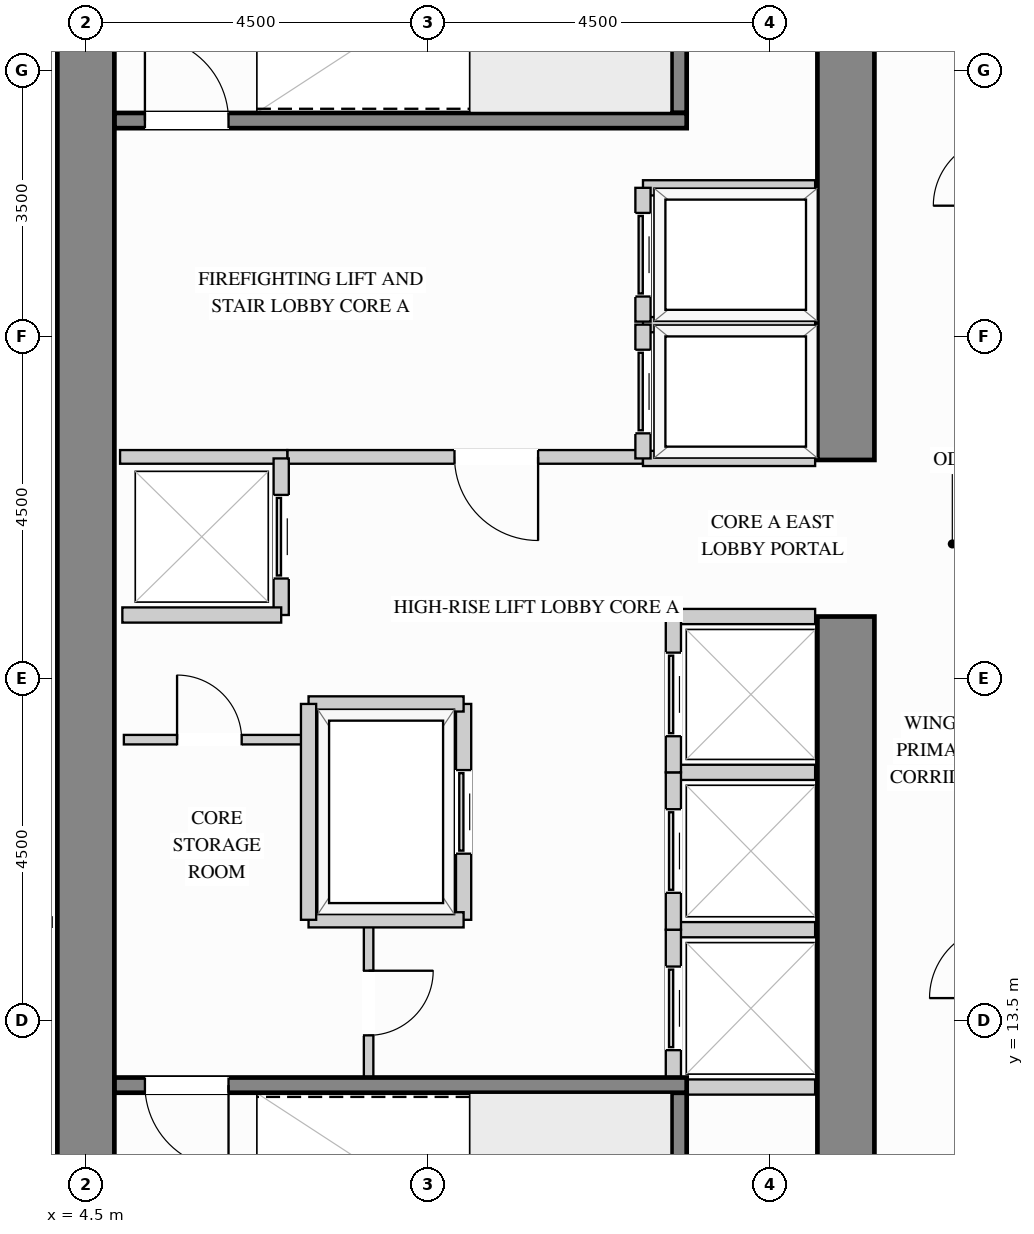
"""IFC4 building model, lengths in metres.
Left out: names, types, materials, properties, quantities, classifications, styles, units other than length and angle.
Written with IfcOpenShell. Run it as: python <this file> out.ifc"""

import sys

from ifc_helpers import new_model, si_unit, direction, frame, frame_2d, origin, place, context, subcontext, project, spatial, rectangle, extrude, source, transform, mapped, element, fill, save


model = new_model("IFC4")
c1 = context("Model", 3, precision=1e-05, world=origin(), true_north=direction((0.0, 1.0)))
c2 = subcontext(c1, "Body", "Model", "MODEL_VIEW")
j1 = project(units=[si_unit("LENGTHUNIT", "METRE"), si_unit("PLANEANGLEUNIT", "RADIAN")], contexts=[c1])
p1 = place(None, origin())
s1 = spatial("IfcSite", under=j1, at=p1, CompositionType="ELEMENT")
p2 = place(p1, origin())
s2 = spatial("IfcBuilding", under=s1, at=p2, CompositionType="ELEMENT")
p3 = place(p2, frame((0.0, 0.0, 127.8)))
s3 = spatial("IfcBuildingStorey", under=s2, at=p3, CompositionType="ELEMENT", Elevation=127.8)
m1 = source(origin(), c2, "Body", "SweptSolid", [
    extrude(rectangle(XDim=9.945, YDim=0.75, at=frame_2d((4.973, 0.0))), origin(), (0.0, 0.0, 1.0), 3.38),
])
p4 = place(p3, frame((14.5, 8.875, 0.0), z_axis=(0.0, 0.0, 1.0), x_axis=(0.0, 1.0, 0.0)))
e1 = element("IfcWall", 1, at=p4, inside=s3, PredefinedType="SHEAR", context=c2, shape_type="MappedRepresentation", body=[
    mapped(m1, transform((0.0, 0.0, 0.0), x_axis=(1.0, 0.0, 0.0), y_axis=(0.0, 1.0, 0.0), z_axis=(0.0, 0.0, 1.0))),
])
m2 = source(origin(), c2, "Body", "SweptSolid", [
    extrude(rectangle(XDim=8.245, YDim=0.75, at=frame_2d((4.123, 0.0))), origin(), (0.0, 0.0, 1.0), 3.38),
])
p5 = place(p3, frame((14.5, 20.88, 0.0), z_axis=(0.0, 0.0, 1.0), x_axis=(0.0, 1.0, 0.0)))
e2 = element("IfcWall", 2, at=p5, inside=s3, PredefinedType="SHEAR", context=c2, shape_type="MappedRepresentation", body=[
    mapped(m2, transform((0.0, 0.0, 0.0), x_axis=(1.0, 0.0, 0.0), y_axis=(0.0, 1.0, 0.0), z_axis=(0.0, 0.0, 1.0))),
])
m3 = source(origin(), c2, "Body", "SweptSolid", [
    extrude(rectangle(XDim=20.25, YDim=0.75, at=frame_2d((10.125, 0.0))), origin(), (0.0, 0.0, 1.0), 3.38),
])
p6 = place(p3, frame((4.5, 8.875, 0.0), z_axis=(0.0, 0.0, 1.0), x_axis=(0.0, 1.0, 0.0)))
e3 = element("IfcWall", 3, at=p6, inside=s3, PredefinedType="SHEAR", context=c2, shape_type="MappedRepresentation", body=[
    mapped(m3, transform((0.0, 0.0, 0.0), x_axis=(1.0, 0.0, 0.0), y_axis=(0.0, 1.0, 0.0), z_axis=(0.0, 0.0, 1.0))),
])
p7 = place(p3, frame((7.15, 20.92, 0.0), z_axis=(0.0, 0.0, 1.0), x_axis=(1.0, 0.0, 0.0)))
e4 = element("IfcWall", 4, at=p7, inside=s3, PredefinedType="PARTITIONING", context=c2, shape_type="SweptSolid", body=[
    extrude(rectangle(XDim=4.68, YDim=0.18, at=frame_2d((2.34, 0.0))), origin(), (0.0, 0.0, 1.0), 3.365),
])
p8 = place(p7, frame((2.2, 0.0, 0.0)))
e5 = element("IfcOpeningElement", 5, at=p8, cuts=e4, PredefinedType="OPENING", context=c2, shape_type="SweptSolid", body=[
    extrude(rectangle(XDim=1.1, YDim=2.15, at=frame_2d((0.55, 1.075))), frame((0.0, 0.1, 0.0), z_axis=(0.0, -1.0, 0.0), x_axis=(1.0, 0.0, 0.0)), (0.0, 0.0, 1.0), 0.2),
])
m4 = source(origin(), c2, "Body", "SweptSolid", [
    extrude(rectangle(XDim=2.2, YDim=0.18, at=frame_2d((1.1, 0.0))), origin(), (0.0, 0.0, 1.0), 3.365),
])
p9 = place(p3, frame((4.95, 20.92, 0.0), z_axis=(0.0, 0.0, 1.0), x_axis=(1.0, 0.0, 0.0)))
e6 = element("IfcWall", 6, at=p9, inside=s3, PredefinedType="PARTITIONING", context=c2, shape_type="MappedRepresentation", body=[
    mapped(m4, transform((0.0, 0.0, 0.0), x_axis=(1.0, 0.0, 0.0), y_axis=(0.0, 1.0, 0.0), z_axis=(0.0, 0.0, 1.0))),
])
p10 = place(p3, frame((8.22, 12.75, 0.0), z_axis=(0.0, 0.0, 1.0), x_axis=(0.0, 1.0, 0.0)))
e7 = element("IfcWall", 7, at=p10, inside=s3, PredefinedType="PARTITIONING", context=c2, shape_type="SweptSolid", body=[
    extrude(rectangle(XDim=2.07, YDim=0.125, at=frame_2d((1.035, 0.0))), origin(), (0.0, 0.0, 1.0), 3.365),
])
p11 = place(p10, frame((0.56, 0.0, 0.0)))
e8 = element("IfcOpeningElement", 8, at=p11, cuts=e7, PredefinedType="OPENING", context=c2, shape_type="SweptSolid", body=[
    extrude(rectangle(XDim=0.85, YDim=2.1, at=frame_2d((0.425, 1.05))), frame((0.0, 0.073, 0.0), z_axis=(0.0, -1.0, 0.0), x_axis=(1.0, 0.0, 0.0)), (0.0, 0.0, 1.0), 0.145),
])
p12 = place(p3, frame((5.0, 17.2, 0.0), z_axis=(0.0, 0.0, 1.0), x_axis=(1.0, 0.0, 0.0)))
e9 = element("IfcWall", 9, at=p12, inside=s3, PredefinedType="PARTITIONING", context=c2, shape_type="SweptSolid", body=[
    extrude(rectangle(XDim=2.4, YDim=0.125, at=frame_2d((1.2, 0.0))), origin(), (0.0, 0.0, 1.0), 3.365),
])
p13 = place(p12, frame((0.7, 0.0, 0.0)))
e10 = element("IfcOpeningElement", 10, at=p13, cuts=e9, PredefinedType="OPENING", context=c2, shape_type="SweptSolid", body=[
    extrude(rectangle(XDim=0.85, YDim=2.1, at=frame_2d((0.425, 1.05))), frame((0.0, 0.073, 0.0), z_axis=(0.0, -1.0, 0.0), x_axis=(1.0, 0.0, 0.0)), (0.0, 0.0, 1.0), 0.145),
])
m5 = source(origin(), c2, "Body", "SweptSolid", [
    extrude(rectangle(XDim=3.698, YDim=0.125, at=frame_2d((1.849, 0.0))), origin(), (0.0, 0.0, 1.0), 3.365),
])
p14 = place(p3, frame((0.352, 14.8, 0.0), z_axis=(0.0, 0.0, 1.0), x_axis=(1.0, 0.0, 0.0)))
e11 = element("IfcWall", 11, at=p14, inside=s3, PredefinedType="PARTITIONING", context=c2, shape_type="MappedRepresentation", body=[
    mapped(m5, transform((0.0, 0.0, 0.0), x_axis=(1.0, 0.0, 0.0), y_axis=(0.0, 1.0, 0.0), z_axis=(0.0, 0.0, 1.0))),
])
m6 = source(origin(), c2, "Body", "SweptSolid", [
    extrude(rectangle(XDim=2.265, YDim=0.2, at=frame_2d((1.132, 0.0))), origin(), (0.0, 0.0, 1.0), 3.365),
])
for number, where, z_axis, x_axis in (
    (12, (11.83, 22.66, 0.0), (0.0, 0.0, 1.0), (1.0, 0.0, 0.0)),
    (13, (11.83, 20.9, 0.0), (0.0, 0.0, 1.0), (1.0, 0.0, 0.0)),
):
    element("IfcWall", number, at=place(p3, frame(where, z_axis=z_axis, x_axis=x_axis)), inside=s3, PredefinedType="PARTITIONING", context=c2, shape_type="MappedRepresentation", body=[
        mapped(m6, transform((0.0, 0.0, 0.0), x_axis=(1.0, 0.0, 0.0), y_axis=(0.0, 1.0, 0.0), z_axis=(0.0, 0.0, 1.0))),
    ])
p15 = place(p3, frame((11.83, 20.9, 0.0), z_axis=(0.0, 0.0, 1.0), x_axis=(0.0, 1.0, 0.0)))
e14 = element("IfcWall", 14, at=p15, inside=s3, PredefinedType="PARTITIONING", context=c2, shape_type="SweptSolid", body=[
    extrude(rectangle(XDim=1.76, YDim=0.2, at=frame_2d((0.88, 0.0))), origin(), (0.0, 0.0, 1.0), 3.365),
])
p16 = place(p15, frame((0.33, 0.0, 0.0)))
e15 = element("IfcOpeningElement", 15, at=p16, cuts=e14, PredefinedType="OPENING", context=c2, shape_type="SweptSolid", body=[
    extrude(rectangle(XDim=1.1, YDim=2.2, at=frame_2d((0.55, 1.1))), frame((0.0, 0.11, 0.0), z_axis=(0.0, -1.0, 0.0), x_axis=(1.0, 0.0, 0.0)), (0.0, 0.0, 1.0), 0.22),
])
p17 = place(p3, frame((11.83, 24.46, 0.0), z_axis=(0.0, 0.0, 1.0), x_axis=(1.0, 0.0, 0.0)))
e16 = element("IfcWall", 16, at=p17, inside=s3, PredefinedType="PARTITIONING", context=c2, shape_type="MappedRepresentation", body=[
    mapped(m6, transform((0.0, 0.0, 0.0), x_axis=(1.0, 0.0, 0.0), y_axis=(0.0, 1.0, 0.0), z_axis=(0.0, 0.0, 1.0))),
])
p18 = place(p3, frame((11.83, 22.7, 0.0), z_axis=(0.0, 0.0, 1.0), x_axis=(0.0, 1.0, 0.0)))
e17 = element("IfcWall", 17, at=p18, inside=s3, PredefinedType="PARTITIONING", context=c2, shape_type="SweptSolid", body=[
    extrude(rectangle(XDim=1.76, YDim=0.2, at=frame_2d((0.88, 0.0))), origin(), (0.0, 0.0, 1.0), 3.365),
])
p19 = place(p18, frame((0.33, 0.0, 0.0)))
e18 = element("IfcOpeningElement", 18, at=p19, cuts=e17, PredefinedType="OPENING", context=c2, shape_type="SweptSolid", body=[
    extrude(rectangle(XDim=1.1, YDim=2.2, at=frame_2d((0.55, 1.1))), frame((0.0, 0.11, 0.0), z_axis=(0.0, -1.0, 0.0), x_axis=(1.0, 0.0, 0.0)), (0.0, 0.0, 1.0), 0.22),
])
m7 = source(origin(), c2, "Body", "SweptSolid", [
    extrude(rectangle(XDim=1.865, YDim=0.2, at=frame_2d((0.933, 0.0))), origin(), (0.0, 0.0, 1.0), 3.365),
])
for number, where, z_axis, x_axis in (
    (19, (12.23, 14.7, 0.0), (0.0, 0.0, 1.0), (1.0, 0.0, 0.0)),
    (20, (12.23, 12.63, 0.0), (0.0, 0.0, 1.0), (1.0, 0.0, 0.0)),
):
    element("IfcWall", number, at=place(p3, frame(where, z_axis=z_axis, x_axis=x_axis)), inside=s3, PredefinedType="PARTITIONING", context=c2, shape_type="MappedRepresentation", body=[
        mapped(m7, transform((0.0, 0.0, 0.0), x_axis=(1.0, 0.0, 0.0), y_axis=(0.0, 1.0, 0.0), z_axis=(0.0, 0.0, 1.0))),
    ])
p20 = place(p3, frame((12.23, 12.63, 0.0), z_axis=(0.0, 0.0, 1.0), x_axis=(0.0, 1.0, 0.0)))
e21 = element("IfcWall", 21, at=p20, inside=s3, PredefinedType="PARTITIONING", context=c2, shape_type="SweptSolid", body=[
    extrude(rectangle(XDim=2.07, YDim=0.2, at=frame_2d((1.035, 0.0))), origin(), (0.0, 0.0, 1.0), 3.365),
])
p21 = place(p20, frame((0.485, 0.0, 0.0)))
e22 = element("IfcOpeningElement", 22, at=p21, cuts=e21, PredefinedType="OPENING", context=c2, shape_type="SweptSolid", body=[
    extrude(rectangle(XDim=1.1, YDim=2.2, at=frame_2d((0.55, 1.1))), frame((0.0, 0.11, 0.0), z_axis=(0.0, -1.0, 0.0), x_axis=(1.0, 0.0, 0.0)), (0.0, 0.0, 1.0), 0.22),
])
p22 = place(p3, frame((12.23, 16.77, 0.0), z_axis=(0.0, 0.0, 1.0), x_axis=(1.0, 0.0, 0.0)))
e23 = element("IfcWall", 23, at=p22, inside=s3, PredefinedType="PARTITIONING", context=c2, shape_type="MappedRepresentation", body=[
    mapped(m7, transform((0.0, 0.0, 0.0), x_axis=(1.0, 0.0, 0.0), y_axis=(0.0, 1.0, 0.0), z_axis=(0.0, 0.0, 1.0))),
])
p23 = place(p3, frame((12.23, 14.7, 0.0), z_axis=(0.0, 0.0, 1.0), x_axis=(0.0, 1.0, 0.0)))
e24 = element("IfcWall", 24, at=p23, inside=s3, PredefinedType="PARTITIONING", context=c2, shape_type="SweptSolid", body=[
    extrude(rectangle(XDim=2.07, YDim=0.2, at=frame_2d((1.035, 0.0))), origin(), (0.0, 0.0, 1.0), 3.365),
])
p24 = place(p23, frame((0.485, 0.0, 0.0)))
e25 = element("IfcOpeningElement", 25, at=p24, cuts=e24, PredefinedType="OPENING", context=c2, shape_type="SweptSolid", body=[
    extrude(rectangle(XDim=1.1, YDim=2.2, at=frame_2d((0.55, 1.1))), frame((0.0, 0.11, 0.0), z_axis=(0.0, -1.0, 0.0), x_axis=(1.0, 0.0, 0.0)), (0.0, 0.0, 1.0), 0.22),
])
p25 = place(p3, frame((12.23, 18.82, 0.0), z_axis=(0.0, 0.0, 1.0), x_axis=(1.0, 0.0, 0.0)))
e26 = element("IfcWall", 26, at=p25, inside=s3, PredefinedType="PARTITIONING", context=c2, shape_type="MappedRepresentation", body=[
    mapped(m7, transform((0.0, 0.0, 0.0), x_axis=(1.0, 0.0, 0.0), y_axis=(0.0, 1.0, 0.0), z_axis=(0.0, 0.0, 1.0))),
])
p26 = place(p3, frame((12.23, 16.77, 0.0), z_axis=(0.0, 0.0, 1.0), x_axis=(0.0, 1.0, 0.0)))
e27 = element("IfcWall", 27, at=p26, inside=s3, PredefinedType="PARTITIONING", context=c2, shape_type="SweptSolid", body=[
    extrude(rectangle(XDim=2.05, YDim=0.2, at=frame_2d((1.025, 0.0))), origin(), (0.0, 0.0, 1.0), 3.365),
])
p27 = place(p26, frame((0.475, 0.0, 0.0)))
e28 = element("IfcOpeningElement", 28, at=p27, cuts=e27, PredefinedType="OPENING", context=c2, shape_type="SweptSolid", body=[
    extrude(rectangle(XDim=1.1, YDim=2.2, at=frame_2d((0.55, 1.1))), frame((0.0, 0.11, 0.0), z_axis=(0.0, -1.0, 0.0), x_axis=(1.0, 0.0, 0.0)), (0.0, 0.0, 1.0), 0.22),
])
p28 = place(p3, frame((7.07, 18.84, 0.0), z_axis=(0.0, 0.0, 1.0), x_axis=(0.0, 1.0, 0.0)))
e29 = element("IfcWall", 29, at=p28, inside=s3, PredefinedType="PARTITIONING", context=c2, shape_type="SweptSolid", body=[
    extrude(rectangle(XDim=2.06, YDim=0.2, at=frame_2d((1.03, 0.0))), origin(), (0.0, 0.0, 1.0), 3.365),
])
p29 = place(p28, frame((0.48, 0.0, 0.0)))
e30 = element("IfcOpeningElement", 30, at=p29, cuts=e29, PredefinedType="OPENING", context=c2, shape_type="SweptSolid", body=[
    extrude(rectangle(XDim=1.1, YDim=2.2, at=frame_2d((0.55, 1.1))), frame((0.0, 0.11, 0.0), z_axis=(0.0, -1.0, 0.0), x_axis=(1.0, 0.0, 0.0)), (0.0, 0.0, 1.0), 0.22),
])
m8 = source(origin(), c2, "Body", "SweptSolid", [
    extrude(rectangle(XDim=2.09, YDim=0.2, at=frame_2d((1.045, 0.0))), origin(), (0.0, 0.0, 1.0), 3.365),
])
p30 = place(p3, frame((4.98, 18.84, 0.0), z_axis=(0.0, 0.0, 1.0), x_axis=(1.0, 0.0, 0.0)))
e31 = element("IfcWall", 31, at=p30, inside=s3, PredefinedType="PARTITIONING", context=c2, shape_type="MappedRepresentation", body=[
    mapped(m8, transform((0.0, 0.0, 0.0), x_axis=(1.0, 0.0, 0.0), y_axis=(0.0, 1.0, 0.0), z_axis=(0.0, 0.0, 1.0))),
])
p31 = place(p3, frame((9.47, 14.83, 0.0), z_axis=(0.0, 0.0, 1.0), x_axis=(0.0, 1.0, 0.0)))
e32 = element("IfcWall", 32, at=p31, inside=s3, PredefinedType="PARTITIONING", context=c2, shape_type="SweptSolid", body=[
    extrude(rectangle(XDim=2.84, YDim=0.2, at=frame_2d((1.42, 0.0))), origin(), (0.0, 0.0, 1.0), 3.365),
])
p32 = place(p31, frame((0.87, 0.0, 0.0)))
e33 = element("IfcOpeningElement", 33, at=p32, cuts=e32, PredefinedType="OPENING", context=c2, shape_type="SweptSolid", body=[
    extrude(rectangle(XDim=1.1, YDim=2.2, at=frame_2d((0.55, 1.1))), frame((0.0, 0.11, 0.0), z_axis=(0.0, -1.0, 0.0), x_axis=(1.0, 0.0, 0.0)), (0.0, 0.0, 1.0), 0.22),
])
m9 = source(origin(), c2, "Body", "SweptSolid", [
    extrude(rectangle(XDim=2.04, YDim=0.2, at=frame_2d((1.02, 0.0))), origin(), (0.0, 0.0, 1.0), 3.365),
])
for number, where, z_axis, x_axis in (
    (34, (7.43, 17.67, 0.0), (0.0, 0.0, 1.0), (1.0, 0.0, 0.0)),
    (35, (7.43, 14.83, 0.0), (0.0, 0.0, 1.0), (1.0, 0.0, 0.0)),
):
    element("IfcWall", number, at=place(p3, frame(where, z_axis=z_axis, x_axis=x_axis)), inside=s3, PredefinedType="PARTITIONING", context=c2, shape_type="MappedRepresentation", body=[
        mapped(m9, transform((0.0, 0.0, 0.0), x_axis=(1.0, 0.0, 0.0), y_axis=(0.0, 1.0, 0.0), z_axis=(0.0, 0.0, 1.0))),
    ])
m10 = source(origin(), c2, "Body", "SweptSolid", [
    extrude(rectangle(XDim=2.84, YDim=0.2, at=frame_2d((1.42, 0.0))), origin(), (0.0, 0.0, 1.0), 3.365),
])
p33 = place(p3, frame((7.43, 14.83, 0.0), z_axis=(0.0, 0.0, 1.0), x_axis=(0.0, 1.0, 0.0)))
e36 = element("IfcWall", 36, at=p33, inside=s3, PredefinedType="PARTITIONING", context=c2, shape_type="MappedRepresentation", body=[
    mapped(m10, transform((0.0, 0.0, 0.0), x_axis=(1.0, 0.0, 0.0), y_axis=(0.0, 1.0, 0.0), z_axis=(0.0, 0.0, 1.0))),
])
m11 = source(origin(), c2, "Body", "SweptSolid", [
    extrude(rectangle(XDim=3.678, YDim=0.2, at=frame_2d((1.839, 0.0))), origin(), (0.0, 0.0, 1.0), 3.38),
])
p34 = place(p3, frame((12.305, 8.877, 0.0), z_axis=(0.0, 0.0, 1.0), x_axis=(0.0, 1.0, 0.0)))
e37 = element("IfcWall", 37, at=p34, inside=s3, PredefinedType="SHEAR", context=c2, shape_type="MappedRepresentation", body=[
    mapped(m11, transform((0.0, 0.0, 0.0), x_axis=(1.0, 0.0, 0.0), y_axis=(0.0, 1.0, 0.0), z_axis=(0.0, 0.0, 1.0))),
])
p35 = place(p3, frame((4.877, 12.655, 0.0), z_axis=(0.0, 0.0, 1.0), x_axis=(1.0, 0.0, 0.0)))
e38 = element("IfcWall", 38, at=p35, inside=s3, PredefinedType="SHEAR", context=c2, shape_type="SweptSolid", body=[
    extrude(rectangle(XDim=7.528, YDim=0.2, at=frame_2d((3.764, 0.0))), origin(), (0.0, 0.0, 1.0), 3.38),
])
p36 = place(p35, frame((0.4, 0.0, 0.0)))
e39 = element("IfcOpeningElement", 39, at=p36, cuts=e38, PredefinedType="OPENING", context=c2, shape_type="SweptSolid", body=[
    extrude(rectangle(XDim=1.1, YDim=2.15, at=frame_2d((0.55, 1.075))), frame((0.0, 0.11, 0.0), z_axis=(0.0, -1.0, 0.0), x_axis=(1.0, 0.0, 0.0)), (0.0, 0.0, 1.0), 0.22),
])
p37 = place(p3, frame((12.305, 25.445, 0.0), z_axis=(0.0, 0.0, 1.0), x_axis=(0.0, 1.0, 0.0)))
e40 = element("IfcWall", 40, at=p37, inside=s3, PredefinedType="SHEAR", context=c2, shape_type="MappedRepresentation", body=[
    mapped(m11, transform((0.0, 0.0, 0.0), x_axis=(1.0, 0.0, 0.0), y_axis=(0.0, 1.0, 0.0), z_axis=(0.0, 0.0, 1.0))),
])
p38 = place(p3, frame((4.877, 25.345, 0.0), z_axis=(0.0, 0.0, 1.0), x_axis=(1.0, 0.0, 0.0)))
e41 = element("IfcWall", 41, at=p38, inside=s3, PredefinedType="SHEAR", context=c2, shape_type="SweptSolid", body=[
    extrude(rectangle(XDim=7.528, YDim=0.2, at=frame_2d((3.764, 0.0))), origin(), (0.0, 0.0, 1.0), 3.38),
])
p39 = place(p38, frame((0.4, 0.0, 0.0)))
e42 = element("IfcOpeningElement", 42, at=p39, cuts=e41, PredefinedType="OPENING", context=c2, shape_type="SweptSolid", body=[
    extrude(rectangle(XDim=1.1, YDim=2.15, at=frame_2d((0.55, 1.075))), frame((0.0, 0.11, 0.0), z_axis=(0.0, -1.0, 0.0), x_axis=(1.0, 0.0, 0.0)), (0.0, 0.0, 1.0), 0.22),
])
m12 = source(origin(), c2, "Body", "SweptSolid", [
    extrude(rectangle(XDim=1.1, YDim=2.15, at=frame_2d((0.55, 1.075))), frame((0.0, 0.025, 0.0), z_axis=(0.0, -1.0, 0.0), x_axis=(1.0, 0.0, 0.0)), (0.0, 0.0, 1.0), 0.05),
])
p40 = place(p8, origin())
e43 = element("IfcDoor", 43, at=p40, inside=s3, OperationType="SINGLE_SWING_RIGHT", PredefinedType="DOOR", context=c2, shape_type="MappedRepresentation", body=[
    mapped(m12, transform((0.0, 0.0, 0.0), x_axis=(1.0, 0.0, 0.0), y_axis=(0.0, 1.0, 0.0), z_axis=(0.0, 0.0, 1.0))),
])
fill(e5, e43)
m13 = source(origin(), c2, "Body", "SweptSolid", [
    extrude(rectangle(XDim=1.1, YDim=2.2, at=frame_2d((0.55, 1.1))), frame((0.0, 0.025, 0.0), z_axis=(0.0, -1.0, 0.0), x_axis=(1.0, 0.0, 0.0)), (0.0, 0.0, 1.0), 0.05),
])
p41 = place(p16, origin())
e44 = element("IfcDoor", 44, at=p41, inside=s3, OperationType="SLIDING_TO_LEFT", PredefinedType="DOOR", context=c2, shape_type="MappedRepresentation", body=[
    mapped(m13, transform((0.0, 0.0, 0.0), x_axis=(1.0, 0.0, 0.0), y_axis=(0.0, 1.0, 0.0), z_axis=(0.0, 0.0, 1.0))),
])
fill(e15, e44)
p42 = place(p19, origin())
e45 = element("IfcDoor", 45, at=p42, inside=s3, OperationType="SLIDING_TO_LEFT", PredefinedType="DOOR", context=c2, shape_type="MappedRepresentation", body=[
    mapped(m13, transform((0.0, 0.0, 0.0), x_axis=(1.0, 0.0, 0.0), y_axis=(0.0, 1.0, 0.0), z_axis=(0.0, 0.0, 1.0))),
])
fill(e18, e45)
p43 = place(p21, origin())
e46 = element("IfcDoor", 46, at=p43, inside=s3, OperationType="SLIDING_TO_LEFT", PredefinedType="DOOR", context=c2, shape_type="MappedRepresentation", body=[
    mapped(m13, transform((0.0, 0.0, 0.0), x_axis=(1.0, 0.0, 0.0), y_axis=(0.0, 1.0, 0.0), z_axis=(0.0, 0.0, 1.0))),
])
fill(e22, e46)
p44 = place(p24, origin())
e47 = element("IfcDoor", 47, at=p44, inside=s3, OperationType="SLIDING_TO_LEFT", PredefinedType="DOOR", context=c2, shape_type="MappedRepresentation", body=[
    mapped(m13, transform((0.0, 0.0, 0.0), x_axis=(1.0, 0.0, 0.0), y_axis=(0.0, 1.0, 0.0), z_axis=(0.0, 0.0, 1.0))),
])
fill(e25, e47)
p45 = place(p27, origin())
e48 = element("IfcDoor", 48, at=p45, inside=s3, OperationType="SLIDING_TO_LEFT", PredefinedType="DOOR", context=c2, shape_type="MappedRepresentation", body=[
    mapped(m13, transform((0.0, 0.0, 0.0), x_axis=(1.0, 0.0, 0.0), y_axis=(0.0, 1.0, 0.0), z_axis=(0.0, 0.0, 1.0))),
])
fill(e28, e48)
p46 = place(p29, origin())
e49 = element("IfcDoor", 49, at=p46, inside=s3, OperationType="SLIDING_TO_LEFT", PredefinedType="DOOR", context=c2, shape_type="MappedRepresentation", body=[
    mapped(m13, transform((0.0, 0.0, 0.0), x_axis=(1.0, 0.0, 0.0), y_axis=(0.0, 1.0, 0.0), z_axis=(0.0, 0.0, 1.0))),
])
fill(e30, e49)
p47 = place(p32, origin())
e50 = element("IfcDoor", 50, at=p47, inside=s3, OperationType="SLIDING_TO_LEFT", PredefinedType="DOOR", context=c2, shape_type="MappedRepresentation", body=[
    mapped(m13, transform((0.0, 0.0, 0.0), x_axis=(1.0, 0.0, 0.0), y_axis=(0.0, 1.0, 0.0), z_axis=(0.0, 0.0, 1.0))),
])
fill(e33, e50)
m14 = source(origin(), c2, "Body", "SweptSolid", [
    extrude(rectangle(XDim=0.85, YDim=2.1, at=frame_2d((0.425, 1.05))), frame((0.0, 0.025, 0.0), z_axis=(0.0, -1.0, 0.0), x_axis=(1.0, 0.0, 0.0)), (0.0, 0.0, 1.0), 0.05),
])
p48 = place(p13, origin())
e51 = element("IfcDoor", 51, at=p48, inside=s3, OperationType="SINGLE_SWING_LEFT", PredefinedType="DOOR", context=c2, shape_type="MappedRepresentation", body=[
    mapped(m14, transform((0.0, 0.0, 0.0), x_axis=(1.0, 0.0, 0.0), y_axis=(0.0, 1.0, 0.0), z_axis=(0.0, 0.0, 1.0))),
])
fill(e10, e51)
p49 = place(p11, origin())
e52 = element("IfcDoor", 52, at=p49, inside=s3, OperationType="SINGLE_SWING_RIGHT", PredefinedType="DOOR", context=c2, shape_type="MappedRepresentation", body=[
    mapped(m14, transform((0.0, 0.0, 0.0), x_axis=(1.0, 0.0, 0.0), y_axis=(0.0, 1.0, 0.0), z_axis=(0.0, 0.0, 1.0))),
])
fill(e8, e52)
m15 = source(origin(), c2, "Body", "SweptSolid", [
    extrude(rectangle(XDim=1.1, YDim=2.15, at=frame_2d((0.55, 1.075))), frame((0.0, 0.025, 0.0), z_axis=(0.0, -1.0, 0.0), x_axis=(1.0, 0.0, 0.0)), (0.0, 0.0, 1.0), 0.05),
])
p50 = place(p36, origin())
e53 = element("IfcDoor", 53, at=p50, inside=s3, OperationType="SINGLE_SWING_RIGHT", PredefinedType="DOOR", context=c2, shape_type="MappedRepresentation", body=[
    mapped(m15, transform((0.0, 0.0, 0.0), x_axis=(1.0, 0.0, 0.0), y_axis=(0.0, 1.0, 0.0), z_axis=(0.0, 0.0, 1.0))),
])
fill(e39, e53)
p51 = place(p39, origin())
e54 = element("IfcDoor", 54, at=p51, inside=s3, OperationType="SINGLE_SWING_LEFT", PredefinedType="DOOR", context=c2, shape_type="MappedRepresentation", body=[
    mapped(m15, transform((0.0, 0.0, 0.0), x_axis=(1.0, 0.0, 0.0), y_axis=(0.0, 1.0, 0.0), z_axis=(0.0, 0.0, 1.0))),
])
fill(e42, e54)
save(model, sys.argv[1])
